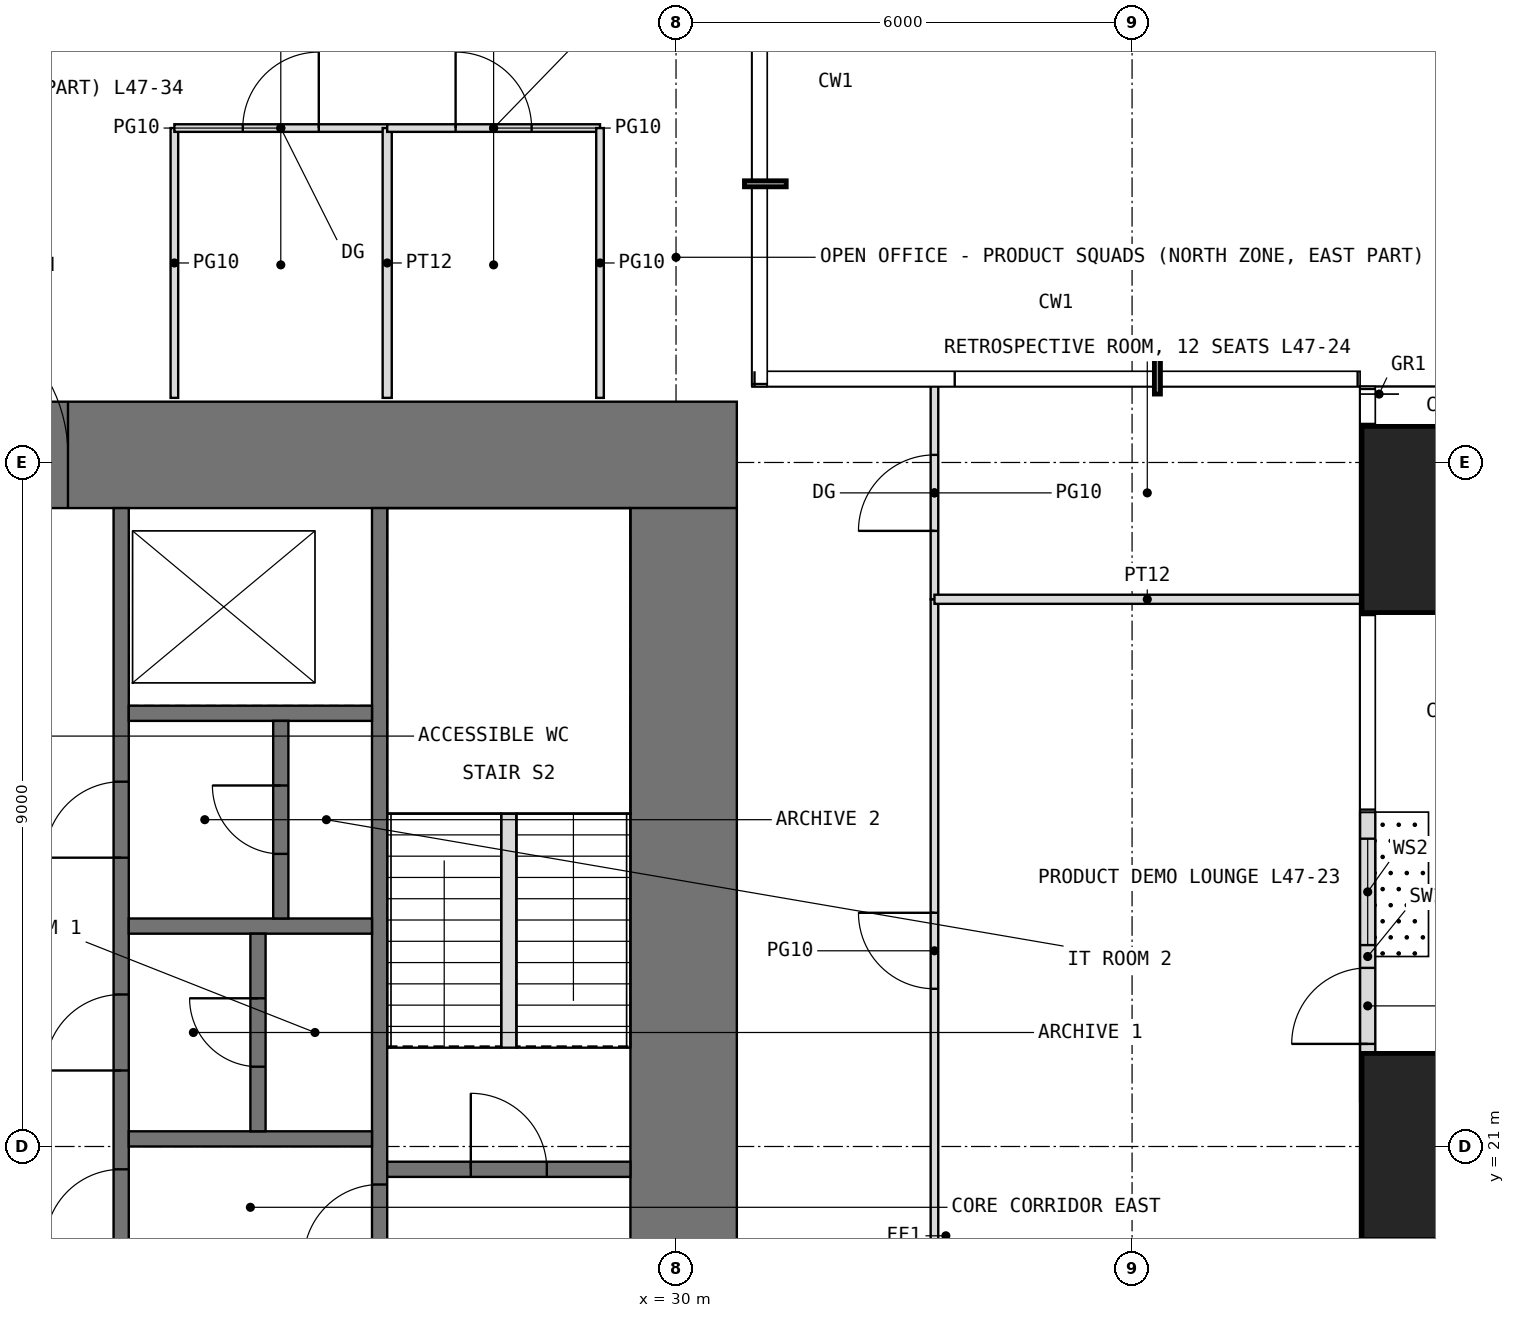
"""IFC4 building model, lengths in metres.
Left out: names, types, materials, properties, quantities, classifications, styles, units other than length and angle.
Written with IfcOpenShell. Run it as: python <this file> out.ifc"""

import sys

from ifc_helpers import new_model, si_unit, direction, frame, frame_2d, origin, origin_2d, place, context, subcontext, project, spatial, rectangle, extrude, element, fill, save


model = new_model("IFC4")
c1 = context("Model", 3, precision=1e-05, world=origin(), true_north=direction((0.0, 1.0)))
c2 = subcontext(c1, "Body", "Model", "MODEL_VIEW")
j1 = project(units=[si_unit("LENGTHUNIT", "METRE"), si_unit("PLANEANGLEUNIT", "RADIAN")], contexts=[c1])
p1 = place(None, origin())
s1 = spatial("IfcSite", under=j1, at=p1, CompositionType="ELEMENT")
p2 = place(p1, origin())
s2 = spatial("IfcBuilding", under=s1, at=p2, CompositionType="ELEMENT")
p3 = place(p2, frame((0.0, 0.0, 198.5)))
s3 = spatial("IfcBuildingStorey", under=s2, at=p3, CompositionType="ELEMENT", Elevation=198.5)
for number, where, z_axis, x_axis in (
    (1, (40.25, 21.0, 0.0), (0.0, 0.0, 1.0), (1.0, 0.0, 0.0)),
    (2, (40.25, 29.25, 0.0), (0.0, 0.0, 1.0), (1.0, 0.0, 0.0)),
):
    element("IfcColumn", number, at=place(p3, frame(where, z_axis=z_axis, x_axis=x_axis)), inside=s3, PredefinedType="COLUMN", context=c2, shape_type="SweptSolid", body=[
        extrude(rectangle(XDim=2.45, YDim=2.45, at=origin_2d()), origin(), (0.0, 0.0, 1.0), 4.0),
    ])
p4 = place(p3, frame((39.1, 21.6, 0.0), z_axis=(0.0, 0.0, 1.0), x_axis=(0.0, 1.0, 0.0)))
e3 = element("IfcWall", 3, at=p4, inside=s3, PredefinedType="USERDEFINED", context=c2, shape_type="SweptSolid", body=[
    extrude(rectangle(XDim=3.8, YDim=0.2, at=frame_2d((1.9, 0.0))), origin(), (0.0, 0.0, 1.0), 3.75),
])
p5 = place(p4, frame((0.75, 0.0, 0.0)))
e4 = element("IfcOpeningElement", 4, at=p5, cuts=e3, PredefinedType="OPENING", context=c2, shape_type="SweptSolid", body=[
    extrude(rectangle(XDim=1.0, YDim=2.4, at=frame_2d((0.5, 1.2))), frame((0.0, 0.11, 0.0), z_axis=(0.0, -1.0, 0.0), x_axis=(1.0, 0.0, 0.0)), (0.0, 0.0, 1.0), 0.22),
])
p6 = place(p4, frame((2.05, 0.0, 0.3)))
e5 = element("IfcOpeningElement", 5, at=p6, cuts=e3, PredefinedType="OPENING", context=c2, shape_type="SweptSolid", body=[
    extrude(rectangle(XDim=1.4, YDim=2.7, at=frame_2d((0.7, 1.35))), frame((0.0, 0.11, 0.0), z_axis=(0.0, -1.0, 0.0), x_axis=(1.0, 0.0, 0.0)), (0.0, 0.0, 1.0), 0.22),
])
p7 = place(p3, frame((11.2, 30.1, -0.05), z_axis=(0.0, 0.0, 1.0), x_axis=(1.0, 0.0, 0.0)))
e6 = element("IfcWall", 6, at=p7, inside=s3, PredefinedType="SHEAR", context=c2, shape_type="SweptSolid", body=[
    extrude(rectangle(XDim=19.6, YDim=1.4, at=frame_2d((9.8, 0.0))), origin(), (0.0, 0.0, 1.0), 4.0),
])
p8 = place(p7, frame((8.8, 0.0, 0.05)))
e7 = element("IfcOpeningElement", 7, at=p8, cuts=e6, PredefinedType="OPENING", context=c2, shape_type="SweptSolid", body=[
    extrude(rectangle(XDim=2.0, YDim=2.2, at=frame_2d((1.0, 1.1))), frame((0.0, 0.71, 0.0), z_axis=(0.0, -1.0, 0.0), x_axis=(1.0, 0.0, 0.0)), (0.0, 0.0, 1.0), 1.42),
])
p9 = place(p3, frame((30.1, 12.6, -0.05), z_axis=(0.0, 0.0, 1.0), x_axis=(0.0, 1.0, 0.0)))
e8 = element("IfcWall", 8, at=p9, inside=s3, PredefinedType="SHEAR", context=c2, shape_type="SweptSolid", body=[
    extrude(rectangle(XDim=16.8, YDim=1.4, at=frame_2d((8.4, 0.0))), origin(), (0.0, 0.0, 1.0), 4.0),
])
p10 = place(p9, frame((5.9, 0.0, 0.05)))
e9 = element("IfcOpeningElement", 9, at=p10, cuts=e8, PredefinedType="OPENING", context=c2, shape_type="SweptSolid", body=[
    extrude(rectangle(XDim=1.0, YDim=2.2, at=frame_2d((0.5, 1.1))), frame((0.0, 0.71, 0.0), z_axis=(0.0, -1.0, 0.0), x_axis=(1.0, 0.0, 0.0)), (0.0, 0.0, 1.0), 1.42),
])
p11 = place(p3, frame((22.7, 12.6, -0.05), z_axis=(0.0, 0.0, 1.0), x_axis=(0.0, 1.0, 0.0)))
e10 = element("IfcWall", 10, at=p11, inside=s3, PredefinedType="SHEAR", context=c2, shape_type="SweptSolid", body=[
    extrude(rectangle(XDim=16.8, YDim=0.2, at=frame_2d((8.4, 0.0))), origin(), (0.0, 0.0, 1.0), 4.0),
])
p12 = place(p11, frame((0.45, 0.0, 0.05)))
e11 = element("IfcOpeningElement", 11, at=p12, cuts=e10, PredefinedType="OPENING", context=c2, shape_type="SweptSolid", body=[
    extrude(rectangle(XDim=0.9, YDim=2.2, at=frame_2d((0.45, 1.1))), frame((0.0, 0.11, 0.0), z_axis=(0.0, -1.0, 0.0), x_axis=(1.0, 0.0, 0.0)), (0.0, 0.0, 1.0), 0.22),
])
p13 = place(p11, frame((7.1, 0.0, 0.05)))
e12 = element("IfcOpeningElement", 12, at=p13, cuts=e10, PredefinedType="OPENING", context=c2, shape_type="SweptSolid", body=[
    extrude(rectangle(XDim=1.0, YDim=2.2, at=frame_2d((0.5, 1.1))), frame((0.0, 0.11, 0.0), z_axis=(0.0, -1.0, 0.0), x_axis=(1.0, 0.0, 0.0)), (0.0, 0.0, 1.0), 0.22),
])
p14 = place(p11, frame((1.95, 0.0, 0.05)))
e13 = element("IfcOpeningElement", 13, at=p14, cuts=e10, PredefinedType="OPENING", context=c2, shape_type="SweptSolid", body=[
    extrude(rectangle(XDim=0.9, YDim=2.2, at=frame_2d((0.45, 1.1))), frame((0.0, 0.11, 0.0), z_axis=(0.0, -1.0, 0.0), x_axis=(1.0, 0.0, 0.0)), (0.0, 0.0, 1.0), 0.22),
])
p15 = place(p11, frame((4.95, 0.0, 0.05)))
e14 = element("IfcOpeningElement", 14, at=p15, cuts=e10, PredefinedType="OPENING", context=c2, shape_type="SweptSolid", body=[
    extrude(rectangle(XDim=0.9, YDim=2.2, at=frame_2d((0.45, 1.1))), frame((0.0, 0.11, 0.0), z_axis=(0.0, -1.0, 0.0), x_axis=(1.0, 0.0, 0.0)), (0.0, 0.0, 1.0), 0.22),
])
p16 = place(p11, frame((9.4, 0.0, 0.05)))
e15 = element("IfcOpeningElement", 15, at=p16, cuts=e10, PredefinedType="OPENING", context=c2, shape_type="SweptSolid", body=[
    extrude(rectangle(XDim=1.0, YDim=2.2, at=frame_2d((0.5, 1.1))), frame((0.0, 0.11, 0.0), z_axis=(0.0, -1.0, 0.0), x_axis=(1.0, 0.0, 0.0)), (0.0, 0.0, 1.0), 0.22),
])
p17 = place(p11, frame((12.2, 0.0, 0.05)))
e16 = element("IfcOpeningElement", 16, at=p17, cuts=e10, PredefinedType="OPENING", context=c2, shape_type="SweptSolid", body=[
    extrude(rectangle(XDim=1.0, YDim=2.2, at=frame_2d((0.5, 1.1))), frame((0.0, 0.11, 0.0), z_axis=(0.0, -1.0, 0.0), x_axis=(1.0, 0.0, 0.0)), (0.0, 0.0, 1.0), 0.22),
])
p18 = place(p3, frame((26.1, 12.6, -0.05), z_axis=(0.0, 0.0, 1.0), x_axis=(0.0, 1.0, 0.0)))
e17 = element("IfcWall", 17, at=p18, inside=s3, PredefinedType="SHEAR", context=c2, shape_type="SweptSolid", body=[
    extrude(rectangle(XDim=16.8, YDim=0.2, at=frame_2d((8.4, 0.0))), origin(), (0.0, 0.0, 1.0), 4.0),
])
p19 = place(p18, frame((6.9, 0.0, 0.05)))
e18 = element("IfcOpeningElement", 18, at=p19, cuts=e17, PredefinedType="OPENING", context=c2, shape_type="SweptSolid", body=[
    extrude(rectangle(XDim=1.0, YDim=2.2, at=frame_2d((0.5, 1.1))), frame((0.0, 0.11, 0.0), z_axis=(0.0, -1.0, 0.0), x_axis=(1.0, 0.0, 0.0)), (0.0, 0.0, 1.0), 0.22),
])
for number, where, z_axis, x_axis in (
    (19, (22.8, 21.1, -0.05), (0.0, 0.0, 1.0), (1.0, 0.0, 0.0)),
    (20, (22.8, 23.9, -0.05), (0.0, 0.0, 1.0), (1.0, 0.0, 0.0)),
    (21, (22.8, 26.7, -0.05), (0.0, 0.0, 1.0), (1.0, 0.0, 0.0)),
):
    element("IfcWall", number, at=place(p3, frame(where, z_axis=z_axis, x_axis=x_axis)), inside=s3, PredefinedType="SHEAR", context=c2, shape_type="SweptSolid", body=[
        extrude(rectangle(XDim=3.2, YDim=0.2, at=frame_2d((1.6, 0.0))), origin(), (0.0, 0.0, 1.0), 4.0),
    ])
p20 = place(p3, frame((26.2, 20.7, -0.05), z_axis=(0.0, 0.0, 1.0), x_axis=(1.0, 0.0, 0.0)))
e22 = element("IfcWall", 22, at=p20, inside=s3, PredefinedType="SHEAR", context=c2, shape_type="SweptSolid", body=[
    extrude(rectangle(XDim=3.2, YDim=0.2, at=frame_2d((1.6, 0.0))), origin(), (0.0, 0.0, 1.0), 4.0),
])
p21 = place(p20, frame((1.1, 0.0, 0.05)))
e23 = element("IfcOpeningElement", 23, at=p21, cuts=e22, PredefinedType="OPENING", context=c2, shape_type="SweptSolid", body=[
    extrude(rectangle(XDim=1.0, YDim=2.2, at=frame_2d((0.5, 1.1))), frame((0.0, 0.11, 0.0), z_axis=(0.0, -1.0, 0.0), x_axis=(1.0, 0.0, 0.0)), (0.0, 0.0, 1.0), 0.22),
])
p22 = place(p3, frame((24.5, 21.2, -0.05), z_axis=(0.0, 0.0, 1.0), x_axis=(0.0, 1.0, 0.0)))
e24 = element("IfcWall", 24, at=p22, inside=s3, PredefinedType="SHEAR", context=c2, shape_type="SweptSolid", body=[
    extrude(rectangle(XDim=2.6, YDim=0.2, at=frame_2d((1.3, 0.0))), origin(), (0.0, 0.0, 1.0), 4.0),
])
p23 = place(p22, frame((0.85, 0.0, 0.05)))
e25 = element("IfcOpeningElement", 25, at=p23, cuts=e24, PredefinedType="OPENING", context=c2, shape_type="SweptSolid", body=[
    extrude(rectangle(XDim=0.9, YDim=2.2, at=frame_2d((0.45, 1.1))), frame((0.0, 0.11, 0.0), z_axis=(0.0, -1.0, 0.0), x_axis=(1.0, 0.0, 0.0)), (0.0, 0.0, 1.0), 0.22),
])
p24 = place(p3, frame((24.8, 24.0, -0.05), z_axis=(0.0, 0.0, 1.0), x_axis=(0.0, 1.0, 0.0)))
e26 = element("IfcWall", 26, at=p24, inside=s3, PredefinedType="SHEAR", context=c2, shape_type="SweptSolid", body=[
    extrude(rectangle(XDim=2.6, YDim=0.2, at=frame_2d((1.3, 0.0))), origin(), (0.0, 0.0, 1.0), 4.0),
])
p25 = place(p24, frame((0.85, 0.0, 0.05)))
e27 = element("IfcOpeningElement", 27, at=p25, cuts=e26, PredefinedType="OPENING", context=c2, shape_type="SweptSolid", body=[
    extrude(rectangle(XDim=0.9, YDim=2.2, at=frame_2d((0.45, 1.1))), frame((0.0, 0.11, 0.0), z_axis=(0.0, -1.0, 0.0), x_axis=(1.0, 0.0, 0.0)), (0.0, 0.0, 1.0), 0.22),
])
p26 = place(p3, frame((23.4, 30.85, 0.0), z_axis=(0.0, 0.0, 1.0), x_axis=(0.0, 1.0, 0.0)))
e28 = element("IfcWall", 28, at=p26, inside=s3, PredefinedType="PARTITIONING", context=c2, shape_type="SweptSolid", body=[
    extrude(rectangle(XDim=3.55, YDim=0.1, at=frame_2d((1.775, 0.0))), origin(), (0.0, 0.0, 1.0), 3.75),
])
p27 = place(p3, frame((23.4, 34.4, 0.0), z_axis=(0.0, 0.0, 1.0), x_axis=(1.0, 0.0, 0.0)))
e29 = element("IfcWall", 29, at=p27, inside=s3, PredefinedType="PARTITIONING", context=c2, shape_type="SweptSolid", body=[
    extrude(rectangle(XDim=2.8, YDim=0.1, at=frame_2d((1.4, 0.0))), origin(), (0.0, 0.0, 1.0), 3.75),
])
p28 = place(p27, frame((0.9, 0.0, 0.0)))
e30 = element("IfcOpeningElement", 30, at=p28, cuts=e29, PredefinedType="OPENING", context=c2, shape_type="SweptSolid", body=[
    extrude(rectangle(XDim=1.0, YDim=2.4, at=frame_2d((0.5, 1.2))), frame((0.0, 0.06, 0.0), z_axis=(0.0, -1.0, 0.0), x_axis=(1.0, 0.0, 0.0)), (0.0, 0.0, 1.0), 0.12),
])
p29 = place(p3, frame((26.2, 30.85, 0.0), z_axis=(0.0, 0.0, 1.0), x_axis=(0.0, 1.0, 0.0)))
e31 = element("IfcWall", 31, at=p29, inside=s3, PredefinedType="PARTITIONING", context=c2, shape_type="SweptSolid", body=[
    extrude(rectangle(XDim=3.55, YDim=0.12, at=frame_2d((1.775, 0.0))), origin(), (0.0, 0.0, 1.0), 3.75),
])
p30 = place(p3, frame((26.2, 34.4, 0.0), z_axis=(0.0, 0.0, 1.0), x_axis=(1.0, 0.0, 0.0)))
e32 = element("IfcWall", 32, at=p30, inside=s3, PredefinedType="PARTITIONING", context=c2, shape_type="SweptSolid", body=[
    extrude(rectangle(XDim=2.8, YDim=0.1, at=frame_2d((1.4, 0.0))), origin(), (0.0, 0.0, 1.0), 3.75),
])
p31 = place(p30, frame((0.9, 0.0, 0.0)))
e33 = element("IfcOpeningElement", 33, at=p31, cuts=e32, PredefinedType="OPENING", context=c2, shape_type="SweptSolid", body=[
    extrude(rectangle(XDim=1.0, YDim=2.4, at=frame_2d((0.5, 1.2))), frame((0.0, 0.06, 0.0), z_axis=(0.0, -1.0, 0.0), x_axis=(1.0, 0.0, 0.0)), (0.0, 0.0, 1.0), 0.12),
])
p32 = place(p3, frame((29.0, 30.85, 0.0), z_axis=(0.0, 0.0, 1.0), x_axis=(0.0, 1.0, 0.0)))
e34 = element("IfcWall", 34, at=p32, inside=s3, PredefinedType="PARTITIONING", context=c2, shape_type="SweptSolid", body=[
    extrude(rectangle(XDim=3.55, YDim=0.1, at=frame_2d((1.775, 0.0))), origin(), (0.0, 0.0, 1.0), 3.75),
])
p33 = place(p3, frame((33.4, 18.95, 0.0), z_axis=(0.0, 0.0, 1.0), x_axis=(0.0, 1.0, 0.0)))
e35 = element("IfcWall", 35, at=p33, inside=s3, PredefinedType="PARTITIONING", context=c2, shape_type="SweptSolid", body=[
    extrude(rectangle(XDim=9.25, YDim=0.1, at=frame_2d((4.625, 0.0))), origin(), (0.0, 0.0, 1.0), 3.75),
])
p34 = place(p33, frame((4.125, 0.0, 0.0)))
e36 = element("IfcOpeningElement", 36, at=p34, cuts=e35, PredefinedType="OPENING", context=c2, shape_type="SweptSolid", body=[
    extrude(rectangle(XDim=1.0, YDim=2.4, at=frame_2d((0.5, 1.2))), frame((0.0, 0.06, 0.0), z_axis=(0.0, -1.0, 0.0), x_axis=(1.0, 0.0, 0.0)), (0.0, 0.0, 1.0), 0.12),
])
p35 = place(p3, frame((33.4, 28.2, 0.0), z_axis=(0.0, 0.0, 1.0), x_axis=(0.0, 1.0, 0.0)))
e37 = element("IfcWall", 37, at=p35, inside=s3, PredefinedType="PARTITIONING", context=c2, shape_type="SweptSolid", body=[
    extrude(rectangle(XDim=2.8, YDim=0.1, at=frame_2d((1.4, 0.0))), origin(), (0.0, 0.0, 1.0), 3.75),
])
p36 = place(p35, frame((0.9, 0.0, 0.0)))
e38 = element("IfcOpeningElement", 38, at=p36, cuts=e37, PredefinedType="OPENING", context=c2, shape_type="SweptSolid", body=[
    extrude(rectangle(XDim=1.0, YDim=2.4, at=frame_2d((0.5, 1.2))), frame((0.0, 0.06, 0.0), z_axis=(0.0, -1.0, 0.0), x_axis=(1.0, 0.0, 0.0)), (0.0, 0.0, 1.0), 0.12),
])
p37 = place(p3, frame((33.4, 28.2, 0.0), z_axis=(0.0, 0.0, 1.0), x_axis=(1.0, 0.0, 0.0)))
e39 = element("IfcWall", 39, at=p37, inside=s3, PredefinedType="PARTITIONING", context=c2, shape_type="SweptSolid", body=[
    extrude(rectangle(XDim=5.6, YDim=0.12, at=frame_2d((2.8, 0.0))), origin(), (0.0, 0.0, 1.0), 3.75),
])
p38 = place(p3, frame((27.8, 22.3, 0.0), z_axis=(0.0, 0.0, 1.0), x_axis=(0.0, 1.0, 0.0)))
e40 = element("IfcWall", 40, at=p38, inside=s3, PredefinedType="PARTITIONING", context=c2, shape_type="SweptSolid", body=[
    extrude(rectangle(XDim=3.08, YDim=0.2, at=frame_2d((1.54, 0.0))), origin(), (0.0, 0.0, 1.0), 4.0),
])
p39 = place(p5, origin())
e41 = element("IfcDoor", 41, at=p39, inside=s3, OperationType="SINGLE_SWING_LEFT", PredefinedType="DOOR", context=c2, shape_type="SweptSolid", body=[
    extrude(rectangle(XDim=1.0, YDim=2.4, at=frame_2d((0.5, 1.2))), frame((0.0, 0.025, 0.0), z_axis=(0.0, -1.0, 0.0), x_axis=(1.0, 0.0, 0.0)), (0.0, 0.0, 1.0), 0.05),
])
fill(e4, e41)
p40 = place(p6, origin())
e42 = element("IfcWindow", 42, at=p40, inside=s3, PartitioningType="SINGLE_PANEL", PredefinedType="WINDOW", context=c2, shape_type="SweptSolid", body=[
    extrude(rectangle(XDim=1.4, YDim=2.7, at=frame_2d((0.7, 1.35))), frame((0.0, 0.03, 0.0), z_axis=(0.0, -1.0, 0.0), x_axis=(1.0, 0.0, 0.0)), (0.0, 0.0, 1.0), 0.06),
])
fill(e5, e42)
p41 = place(p8, origin())
e43 = element("IfcDoor", 43, at=p41, inside=s3, OperationType="DOUBLE_DOOR_SINGLE_SWING", PredefinedType="DOOR", context=c2, shape_type="SweptSolid", body=[
    extrude(rectangle(XDim=2.0, YDim=2.2, at=frame_2d((1.0, 1.1))), frame((0.0, 0.025, 0.0), z_axis=(0.0, -1.0, 0.0), x_axis=(1.0, 0.0, 0.0)), (0.0, 0.0, 1.0), 0.05),
])
fill(e7, e43)
p42 = place(p21, origin())
e44 = element("IfcDoor", 44, at=p42, inside=s3, OperationType="SINGLE_SWING_LEFT", PredefinedType="DOOR", context=c2, shape_type="SweptSolid", body=[
    extrude(rectangle(XDim=1.0, YDim=2.2, at=frame_2d((0.5, 1.1))), frame((0.0, 0.025, 0.0), z_axis=(0.0, -1.0, 0.0), x_axis=(1.0, 0.0, 0.0)), (0.0, 0.0, 1.0), 0.05),
])
fill(e23, e44)
p43 = place(p19, origin())
e45 = element("IfcDoor", 45, at=p43, inside=s3, OperationType="SINGLE_SWING_LEFT", PredefinedType="DOOR", context=c2, shape_type="SweptSolid", body=[
    extrude(rectangle(XDim=1.0, YDim=2.2, at=frame_2d((0.5, 1.1))), frame((0.0, 0.025, 0.0), z_axis=(0.0, -1.0, 0.0), x_axis=(1.0, 0.0, 0.0)), (0.0, 0.0, 1.0), 0.05),
])
fill(e18, e45)
p44 = place(p13, origin())
e46 = element("IfcDoor", 46, at=p44, inside=s3, OperationType="SINGLE_SWING_LEFT", PredefinedType="DOOR", context=c2, shape_type="SweptSolid", body=[
    extrude(rectangle(XDim=1.0, YDim=2.2, at=frame_2d((0.5, 1.1))), frame((0.0, 0.025, 0.0), z_axis=(0.0, -1.0, 0.0), x_axis=(1.0, 0.0, 0.0)), (0.0, 0.0, 1.0), 0.05),
])
fill(e12, e46)
p45 = place(p16, origin())
e47 = element("IfcDoor", 47, at=p45, inside=s3, OperationType="SINGLE_SWING_LEFT", PredefinedType="DOOR", context=c2, shape_type="SweptSolid", body=[
    extrude(rectangle(XDim=1.0, YDim=2.2, at=frame_2d((0.5, 1.1))), frame((0.0, 0.025, 0.0), z_axis=(0.0, -1.0, 0.0), x_axis=(1.0, 0.0, 0.0)), (0.0, 0.0, 1.0), 0.05),
])
fill(e15, e47)
p46 = place(p23, origin())
e48 = element("IfcDoor", 48, at=p46, inside=s3, OperationType="SINGLE_SWING_RIGHT", PredefinedType="DOOR", context=c2, shape_type="SweptSolid", body=[
    extrude(rectangle(XDim=0.9, YDim=2.2, at=frame_2d((0.45, 1.1))), frame((0.0, 0.025, 0.0), z_axis=(0.0, -1.0, 0.0), x_axis=(1.0, 0.0, 0.0)), (0.0, 0.0, 1.0), 0.05),
])
fill(e25, e48)
p47 = place(p17, origin())
e49 = element("IfcDoor", 49, at=p47, inside=s3, OperationType="SINGLE_SWING_LEFT", PredefinedType="DOOR", context=c2, shape_type="SweptSolid", body=[
    extrude(rectangle(XDim=1.0, YDim=2.2, at=frame_2d((0.5, 1.1))), frame((0.0, 0.025, 0.0), z_axis=(0.0, -1.0, 0.0), x_axis=(1.0, 0.0, 0.0)), (0.0, 0.0, 1.0), 0.05),
])
fill(e16, e49)
p48 = place(p25, origin())
e50 = element("IfcDoor", 50, at=p48, inside=s3, OperationType="SINGLE_SWING_RIGHT", PredefinedType="DOOR", context=c2, shape_type="SweptSolid", body=[
    extrude(rectangle(XDim=0.9, YDim=2.2, at=frame_2d((0.45, 1.1))), frame((0.0, 0.025, 0.0), z_axis=(0.0, -1.0, 0.0), x_axis=(1.0, 0.0, 0.0)), (0.0, 0.0, 1.0), 0.05),
])
fill(e27, e50)
p49 = place(p34, origin())
e51 = element("IfcDoor", 51, at=p49, inside=s3, OperationType="SINGLE_SWING_RIGHT", PredefinedType="DOOR", context=c2, shape_type="SweptSolid", body=[
    extrude(rectangle(XDim=1.0, YDim=2.4, at=frame_2d((0.5, 1.2))), frame((0.0, 0.025, 0.0), z_axis=(0.0, -1.0, 0.0), x_axis=(1.0, 0.0, 0.0)), (0.0, 0.0, 1.0), 0.05),
])
fill(e36, e51)
p50 = place(p36, origin())
e52 = element("IfcDoor", 52, at=p50, inside=s3, OperationType="SINGLE_SWING_LEFT", PredefinedType="DOOR", context=c2, shape_type="SweptSolid", body=[
    extrude(rectangle(XDim=1.0, YDim=2.4, at=frame_2d((0.5, 1.2))), frame((0.0, 0.025, 0.0), z_axis=(0.0, -1.0, 0.0), x_axis=(1.0, 0.0, 0.0)), (0.0, 0.0, 1.0), 0.05),
])
fill(e38, e52)
p51 = place(p28, origin())
e53 = element("IfcDoor", 53, at=p51, inside=s3, OperationType="SINGLE_SWING_RIGHT", PredefinedType="DOOR", context=c2, shape_type="SweptSolid", body=[
    extrude(rectangle(XDim=1.0, YDim=2.4, at=frame_2d((0.5, 1.2))), frame((0.0, 0.025, 0.0), z_axis=(0.0, -1.0, 0.0), x_axis=(1.0, 0.0, 0.0)), (0.0, 0.0, 1.0), 0.05),
])
fill(e30, e53)
p52 = place(p31, origin())
e54 = element("IfcDoor", 54, at=p52, inside=s3, OperationType="SINGLE_SWING_LEFT", PredefinedType="DOOR", context=c2, shape_type="SweptSolid", body=[
    extrude(rectangle(XDim=1.0, YDim=2.4, at=frame_2d((0.5, 1.2))), frame((0.0, 0.025, 0.0), z_axis=(0.0, -1.0, 0.0), x_axis=(1.0, 0.0, 0.0)), (0.0, 0.0, 1.0), 0.05),
])
fill(e33, e54)
save(model, sys.argv[1])
